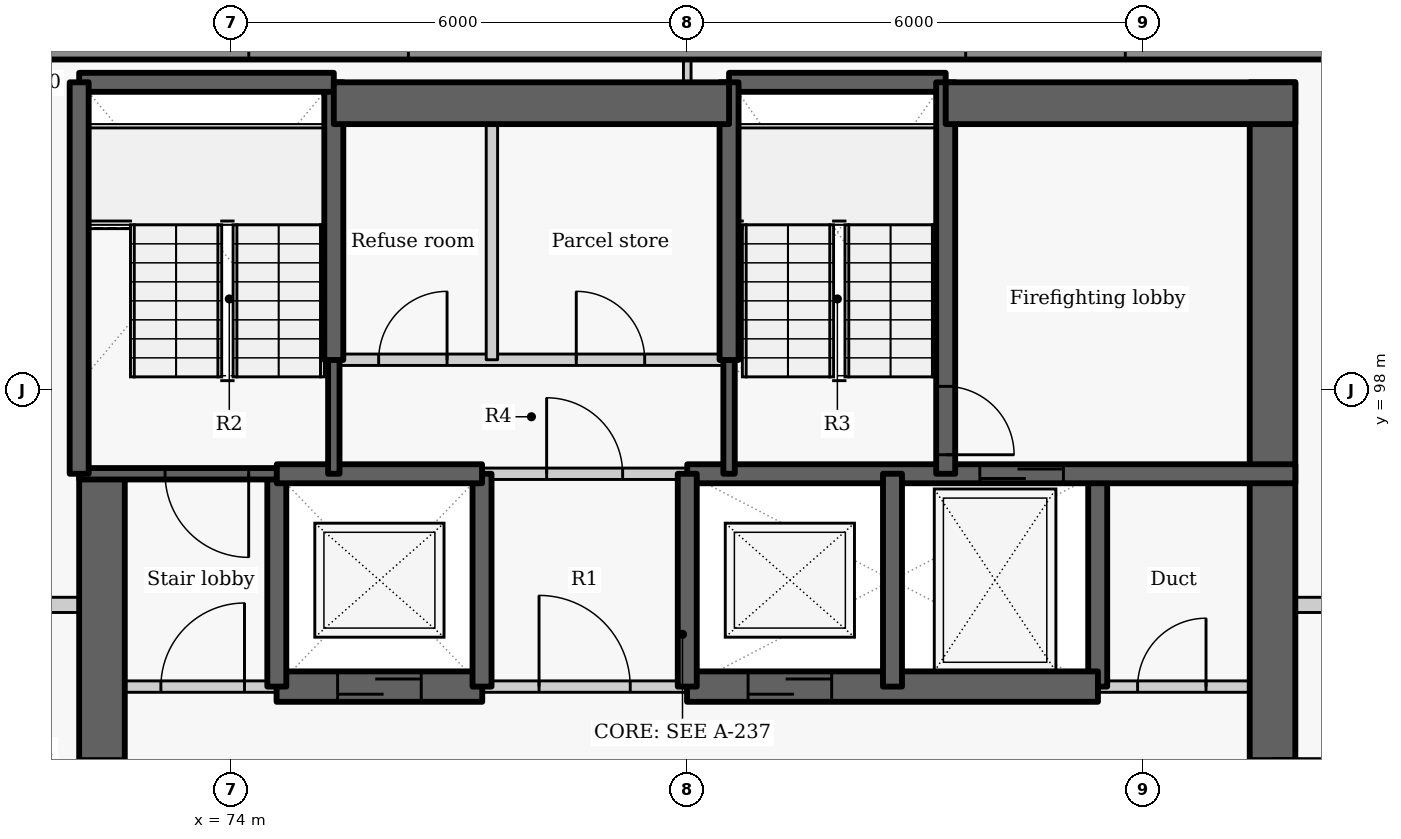
"""IFC4 building model, lengths in metres.
Left out: names, types, materials, properties, quantities, classifications, styles, units other than length and angle.
Written with IfcOpenShell. Run it as: python <this file> out.ifc"""

import sys

from ifc_helpers import new_model, si_unit, direction, frame, frame_2d, origin, place, context, subcontext, project, spatial, rectangle, extrude, element, fill, save


model = new_model("IFC4")
c1 = context("Model", 3, precision=1e-05, world=origin(), true_north=direction((0.0, 1.0)))
c2 = subcontext(c1, "Body", "Model", "MODEL_VIEW")
j1 = project(units=[si_unit("LENGTHUNIT", "METRE"), si_unit("PLANEANGLEUNIT", "RADIAN")], contexts=[c1])
p1 = place(None, origin())
s1 = spatial("IfcSite", under=j1, at=p1, CompositionType="ELEMENT")
p2 = place(p1, origin())
s2 = spatial("IfcBuilding", under=s1, at=p2, CompositionType="ELEMENT")
p3 = place(p2, frame((0.0, 0.0, 216.3)))
s3 = spatial("IfcBuildingStorey", under=s2, at=p3, CompositionType="ELEMENT", Elevation=216.3)
p4 = place(p3, frame((89.449, 102.5, 0.0), z_axis=(0.0, 0.0, 1.0), x_axis=(-1.0, 0.0, 0.0)))
e1 = element("IfcWall", 1, at=p4, inside=s3, PredefinedType="SOLIDWALL", context=c2, shape_type="SweptSolid", body=[
    extrude(rectangle(XDim=18.933, YDim=0.3, at=frame_2d((9.466, 0.0))), origin(), (0.0, 0.0, 1.0), 2.05),
])
p5 = place(p4, frame((3.687, 0.0, 0.9)))
e2 = element("IfcOpeningElement", 2, at=p5, cuts=e1, PredefinedType="OPENING", context=c2, shape_type="SweptSolid", body=[
    extrude(rectangle(XDim=2.1, YDim=1.1, at=frame_2d((1.05, 0.55))), frame((0.0, 0.16, 0.0), z_axis=(0.0, -1.0, 0.0), x_axis=(1.0, 0.0, 0.0)), (0.0, 0.0, 1.0), 0.32),
])
p6 = place(p4, frame((13.118, 0.0, 0.9)))
e3 = element("IfcOpeningElement", 3, at=p6, cuts=e1, PredefinedType="OPENING", context=c2, shape_type="SweptSolid", body=[
    extrude(rectangle(XDim=2.1, YDim=1.1, at=frame_2d((1.05, 0.55))), frame((0.0, 0.16, 0.0), z_axis=(0.0, -1.0, 0.0), x_axis=(1.0, 0.0, 0.0)), (0.0, 0.0, 1.0), 0.32),
])
p7 = place(p3, frame((72.3, 87.8, -0.275), z_axis=(0.0, 0.0, 1.0), x_axis=(0.0, 1.0, 0.0)))
e4 = element("IfcWall", 4, at=p7, inside=s3, PredefinedType="SHEAR", context=c2, shape_type="SweptSolid", body=[
    extrude(rectangle(XDim=9.1, YDim=0.6, at=frame_2d((4.55, 0.0))), origin(), (0.0, 0.0, 1.0), 3.225),
])
p8 = place(p7, frame((3.852, 0.0, 0.275)))
e5 = element("IfcOpeningElement", 5, at=p8, cuts=e4, PredefinedType="OPENING", context=c2, shape_type="SweptSolid", body=[
    extrude(rectangle(XDim=1.5, YDim=2.1, at=frame_2d((0.75, 1.05))), frame((0.0, 0.31, 0.0), z_axis=(0.0, -1.0, 0.0), x_axis=(1.0, 0.0, 0.0)), (0.0, 0.0, 1.0), 0.62),
])
p9 = place(p3, frame((85.4, 94.1, -0.275), z_axis=(0.0, 0.0, 1.0), x_axis=(0.0, 1.0, 0.0)))
e6 = element("IfcWall", 6, at=p9, inside=s3, PredefinedType="SHEAR", context=c2, shape_type="SweptSolid", body=[
    extrude(rectangle(XDim=2.8, YDim=0.25, at=frame_2d((1.4, 0.0))), origin(), (0.0, 0.0, 1.0), 3.225),
])
p10 = place(p3, frame((87.7, 102.05, -0.275), z_axis=(0.0, 0.0, 1.0), x_axis=(0.0, -1.0, 0.0)))
e7 = element("IfcWall", 7, at=p10, inside=s3, PredefinedType="SHEAR", context=c2, shape_type="SweptSolid", body=[
    extrude(rectangle(XDim=14.25, YDim=0.6, at=frame_2d((7.125, 0.0))), origin(), (0.0, 0.0, 1.0), 3.225),
])
p11 = place(p10, frame((8.898, 0.0, 0.275)))
e8 = element("IfcOpeningElement", 8, at=p11, cuts=e7, PredefinedType="OPENING", context=c2, shape_type="SweptSolid", body=[
    extrude(rectangle(XDim=1.5, YDim=2.1, at=frame_2d((0.75, 1.05))), frame((0.0, 0.31, 0.0), z_axis=(0.0, -1.0, 0.0), x_axis=(1.0, 0.0, 0.0)), (0.0, 0.0, 1.0), 0.62),
])
p12 = place(p3, frame((72.0, 94.1, 0.0), z_axis=(0.0, 0.0, 1.0), x_axis=(1.0, 0.0, 0.0)))
e9 = element("IfcWall", 9, at=p12, inside=s3, PredefinedType="PARTITIONING", context=c2, shape_type="SweptSolid", body=[
    extrude(rectangle(XDim=2.603, YDim=0.15, at=frame_2d((1.302, 0.0))), origin(), (0.0, 0.0, 1.0), 2.95),
])
p13 = place(p12, frame((1.075, 0.0, 0.0)))
e10 = element("IfcOpeningElement", 10, at=p13, cuts=e9, PredefinedType="OPENING", context=c2, shape_type="SweptSolid", body=[
    extrude(rectangle(XDim=1.1, YDim=2.1, at=frame_2d((0.55, 1.05))), frame((0.0, 0.085, 0.0), z_axis=(0.0, -1.0, 0.0), x_axis=(1.0, 0.0, 0.0)), (0.0, 0.0, 1.0), 0.17),
])
p14 = place(p3, frame((77.297, 94.1, 0.0), z_axis=(0.0, 0.0, 1.0), x_axis=(1.0, 0.0, 0.0)))
e11 = element("IfcWall", 11, at=p14, inside=s3, PredefinedType="PARTITIONING", context=c2, shape_type="SweptSolid", body=[
    extrude(rectangle(XDim=2.706, YDim=0.15, at=frame_2d((1.353, 0.0))), origin(), (0.0, 0.0, 1.0), 2.95),
])
p15 = place(p14, frame((0.753, 0.0, 0.0)))
e12 = element("IfcOpeningElement", 12, at=p15, cuts=e11, PredefinedType="OPENING", context=c2, shape_type="SweptSolid", body=[
    extrude(rectangle(XDim=1.2, YDim=2.1, at=frame_2d((0.6, 1.05))), frame((0.0, 0.085, 0.0), z_axis=(0.0, -1.0, 0.0), x_axis=(1.0, 0.0, 0.0)), (0.0, 0.0, 1.0), 0.17),
])
p16 = place(p3, frame((85.397, 94.1, 0.0), z_axis=(0.0, 0.0, 1.0), x_axis=(1.0, 0.0, 0.0)))
e13 = element("IfcWall", 13, at=p16, inside=s3, PredefinedType="PARTITIONING", context=c2, shape_type="SweptSolid", body=[
    extrude(rectangle(XDim=2.603, YDim=0.15, at=frame_2d((1.302, 0.0))), origin(), (0.0, 0.0, 1.0), 2.95),
])
p17 = place(p16, frame((0.528, 0.0, 0.0)))
e14 = element("IfcOpeningElement", 14, at=p17, cuts=e13, PredefinedType="OPENING", context=c2, shape_type="SweptSolid", body=[
    extrude(rectangle(XDim=0.9, YDim=2.1, at=frame_2d((0.45, 1.05))), frame((0.0, 0.085, 0.0), z_axis=(0.0, -1.0, 0.0), x_axis=(1.0, 0.0, 0.0)), (0.0, 0.0, 1.0), 0.17),
])
p18 = place(p3, frame((74.597, 94.1, -0.275), z_axis=(0.0, 0.0, 1.0), x_axis=(1.0, 0.0, 0.0)))
e15 = element("IfcWall", 15, at=p18, inside=s3, PredefinedType="SHEAR", context=c2, shape_type="SweptSolid", body=[
    extrude(rectangle(XDim=2.706, YDim=0.4, at=frame_2d((1.353, 0.0))), origin(), (0.0, 0.0, 1.0), 3.225),
])
p19 = place(p18, frame((0.803, 0.0, 0.275)))
e16 = element("IfcOpeningElement", 16, at=p19, cuts=e15, PredefinedType="OPENING", context=c2, shape_type="SweptSolid", body=[
    extrude(rectangle(XDim=1.1, YDim=2.1, at=frame_2d((0.55, 1.05))), frame((0.0, 0.21, 0.0), z_axis=(0.0, -1.0, 0.0), x_axis=(1.0, 0.0, 0.0)), (0.0, 0.0, 1.0), 0.42),
])
p20 = place(p3, frame((79.997, 94.1, -0.275), z_axis=(0.0, 0.0, 1.0), x_axis=(1.0, 0.0, 0.0)))
e17 = element("IfcWall", 17, at=p20, inside=s3, PredefinedType="SHEAR", context=c2, shape_type="SweptSolid", body=[
    extrude(rectangle(XDim=5.406, YDim=0.4, at=frame_2d((2.703, 0.0))), origin(), (0.0, 0.0, 1.0), 3.225),
])
p21 = place(p20, frame((0.803, 0.0, 0.275)))
e18 = element("IfcOpeningElement", 18, at=p21, cuts=e17, PredefinedType="OPENING", context=c2, shape_type="SweptSolid", body=[
    extrude(rectangle(XDim=1.1, YDim=2.1, at=frame_2d((0.55, 1.05))), frame((0.0, 0.21, 0.0), z_axis=(0.0, -1.0, 0.0), x_axis=(1.0, 0.0, 0.0)), (0.0, 0.0, 1.0), 0.42),
])
p22 = place(p3, frame((74.6, 94.1, -0.275), z_axis=(0.0, 0.0, 1.0), x_axis=(0.0, 1.0, 0.0)))
e19 = element("IfcWall", 19, at=p22, inside=s3, PredefinedType="SHEAR", context=c2, shape_type="SweptSolid", body=[
    extrude(rectangle(XDim=2.8, YDim=0.25, at=frame_2d((1.4, 0.0))), origin(), (0.0, 0.0, 1.0), 3.225),
])
p23 = place(p3, frame((74.6, 96.9, -0.275), z_axis=(0.0, 0.0, 1.0), x_axis=(-1.0, 0.0, 0.0)))
e20 = element("IfcWall", 20, at=p23, inside=s3, PredefinedType="SHEAR", context=c2, shape_type="SweptSolid", body=[
    extrude(rectangle(XDim=2.6, YDim=0.15, at=frame_2d((1.3, 0.0))), origin(), (0.0, 0.0, 1.0), 3.225),
])
p24 = place(p23, frame((0.37, 0.0, 0.275)))
e21 = element("IfcOpeningElement", 21, at=p24, cuts=e20, PredefinedType="OPENING", context=c2, shape_type="SweptSolid", body=[
    extrude(rectangle(XDim=1.1, YDim=2.1, at=frame_2d((0.55, 1.05))), frame((0.0, 0.085, 0.0), z_axis=(0.0, -1.0, 0.0), x_axis=(1.0, 0.0, 0.0)), (0.0, 0.0, 1.0), 0.17),
])
p25 = place(p3, frame((77.3, 94.1, -0.275), z_axis=(0.0, 0.0, 1.0), x_axis=(0.0, 1.0, 0.0)))
e22 = element("IfcWall", 22, at=p25, inside=s3, PredefinedType="SHEAR", context=c2, shape_type="SweptSolid", body=[
    extrude(rectangle(XDim=2.8, YDim=0.25, at=frame_2d((1.4, 0.0))), origin(), (0.0, 0.0, 1.0), 3.225),
])
p26 = place(p3, frame((74.6, 96.9, -0.275), z_axis=(0.0, 0.0, 1.0), x_axis=(1.0, 0.0, 0.0)))
e23 = element("IfcWall", 23, at=p26, inside=s3, PredefinedType="SHEAR", context=c2, shape_type="SweptSolid", body=[
    extrude(rectangle(XDim=2.7, YDim=0.25, at=frame_2d((1.35, 0.0))), origin(), (0.0, 0.0, 1.0), 3.225),
])
p27 = place(p3, frame((80.0, 96.9, -0.275), z_axis=(0.0, 0.0, 1.0), x_axis=(1.0, 0.0, 0.0)))
e24 = element("IfcWall", 24, at=p27, inside=s3, PredefinedType="SHEAR", context=c2, shape_type="SweptSolid", body=[
    extrude(rectangle(XDim=8.0, YDim=0.25, at=frame_2d((4.0, 0.0))), origin(), (0.0, 0.0, 1.0), 3.225),
])
p28 = place(p27, frame((3.849, 0.0, 0.275)))
e25 = element("IfcOpeningElement", 25, at=p28, cuts=e24, PredefinedType="OPENING", context=c2, shape_type="SweptSolid", body=[
    extrude(rectangle(XDim=1.1, YDim=2.1, at=frame_2d((0.55, 1.05))), frame((0.0, 0.135, 0.0), z_axis=(0.0, -1.0, 0.0), x_axis=(1.0, 0.0, 0.0)), (0.0, 0.0, 1.0), 0.27),
])
p29 = place(p3, frame((80.0, 94.1, -0.275), z_axis=(0.0, 0.0, 1.0), x_axis=(0.0, 1.0, 0.0)))
e26 = element("IfcWall", 26, at=p29, inside=s3, PredefinedType="SHEAR", context=c2, shape_type="SweptSolid", body=[
    extrude(rectangle(XDim=2.8, YDim=0.25, at=frame_2d((1.4, 0.0))), origin(), (0.0, 0.0, 1.0), 3.225),
])
p30 = place(p3, frame((77.3, 96.9, 0.0), z_axis=(0.0, 0.0, 1.0), x_axis=(1.0, 0.0, 0.0)))
e27 = element("IfcWall", 27, at=p30, inside=s3, PredefinedType="PARTITIONING", context=c2, shape_type="SweptSolid", body=[
    extrude(rectangle(XDim=2.7, YDim=0.15, at=frame_2d((1.35, 0.0))), origin(), (0.0, 0.0, 1.0), 2.95),
])
p31 = place(p30, frame((0.85, 0.0, 0.0)))
e28 = element("IfcOpeningElement", 28, at=p31, cuts=e27, PredefinedType="OPENING", context=c2, shape_type="SweptSolid", body=[
    extrude(rectangle(XDim=1.0, YDim=2.1, at=frame_2d((0.5, 1.05))), frame((0.0, 0.085, 0.0), z_axis=(0.0, -1.0, 0.0), x_axis=(1.0, 0.0, 0.0)), (0.0, 0.0, 1.0), 0.17),
])
p32 = place(p3, frame((82.7, 94.1, -0.275), z_axis=(0.0, 0.0, 1.0), x_axis=(0.0, 1.0, 0.0)))
e29 = element("IfcWall", 29, at=p32, inside=s3, PredefinedType="SHEAR", context=c2, shape_type="SweptSolid", body=[
    extrude(rectangle(XDim=2.8, YDim=0.25, at=frame_2d((1.4, 0.0))), origin(), (0.0, 0.0, 1.0), 3.225),
])
p33 = place(p3, frame((75.35, 96.9, -0.275), z_axis=(0.0, 0.0, 1.0), x_axis=(0.0, 1.0, 0.0)))
e30 = element("IfcWall", 30, at=p33, inside=s3, PredefinedType="SHEAR", context=c2, shape_type="SweptSolid", body=[
    extrude(rectangle(XDim=1.503, YDim=0.15, at=frame_2d((0.751, 0.0))), origin(), (0.0, 0.0, 1.0), 3.225),
])
p34 = place(p3, frame((75.35, 98.397, -0.275), z_axis=(0.0, 0.0, 1.0), x_axis=(0.0, 1.0, 0.0)))
e31 = element("IfcWall", 31, at=p34, inside=s3, PredefinedType="SHEAR", context=c2, shape_type="SweptSolid", body=[
    extrude(rectangle(XDim=3.653, YDim=0.25, at=frame_2d((1.827, 0.0))), origin(), (0.0, 0.0, 1.0), 3.225),
])
p35 = place(p3, frame((72.0, 102.05, -0.275), z_axis=(0.0, 0.0, 1.0), x_axis=(1.0, 0.0, 0.0)))
e32 = element("IfcWall", 32, at=p35, inside=s3, PredefinedType="SHEAR", context=c2, shape_type="SweptSolid", body=[
    extrude(rectangle(XDim=3.35, YDim=0.25, at=frame_2d((1.675, 0.0))), origin(), (0.0, 0.0, 1.0), 3.225),
])
p36 = place(p3, frame((80.55, 102.05, -0.275), z_axis=(0.0, 0.0, 1.0), x_axis=(1.0, 0.0, 0.0)))
e33 = element("IfcWall", 33, at=p36, inside=s3, PredefinedType="SHEAR", context=c2, shape_type="SweptSolid", body=[
    extrude(rectangle(XDim=2.85, YDim=0.25, at=frame_2d((1.425, 0.0))), origin(), (0.0, 0.0, 1.0), 3.225),
])
p37 = place(p3, frame((72.0, 96.9, -0.275), z_axis=(0.0, 0.0, 1.0), x_axis=(0.0, 1.0, 0.0)))
e34 = element("IfcWall", 34, at=p37, inside=s3, PredefinedType="SHEAR", context=c2, shape_type="SweptSolid", body=[
    extrude(rectangle(XDim=5.15, YDim=0.25, at=frame_2d((2.575, 0.0))), origin(), (0.0, 0.0, 1.0), 3.225),
])
p38 = place(p3, frame((83.4, 102.05, -0.275), z_axis=(0.0, 0.0, 1.0), x_axis=(0.0, -1.0, 0.0)))
e35 = element("IfcWall", 35, at=p38, inside=s3, PredefinedType="SHEAR", context=c2, shape_type="SweptSolid", body=[
    extrude(rectangle(XDim=5.15, YDim=0.25, at=frame_2d((2.575, 0.0))), origin(), (0.0, 0.0, 1.0), 3.225),
])
p39 = place(p38, frame((4.0, 0.0, 0.275)))
e36 = element("IfcOpeningElement", 36, at=p39, cuts=e35, PredefinedType="OPENING", context=c2, shape_type="SweptSolid", body=[
    extrude(rectangle(XDim=0.9, YDim=2.1, at=frame_2d((0.45, 1.05))), frame((0.0, 0.135, 0.0), z_axis=(0.0, -1.0, 0.0), x_axis=(1.0, 0.0, 0.0)), (0.0, 0.0, 1.0), 0.27),
])
p40 = place(p3, frame((80.55, 96.9, -0.275), z_axis=(0.0, 0.0, 1.0), x_axis=(0.0, 1.0, 0.0)))
e37 = element("IfcWall", 37, at=p40, inside=s3, PredefinedType="SHEAR", context=c2, shape_type="SweptSolid", body=[
    extrude(rectangle(XDim=1.503, YDim=0.15, at=frame_2d((0.751, 0.0))), origin(), (0.0, 0.0, 1.0), 3.225),
])
p41 = place(p3, frame((80.55, 98.397, -0.275), z_axis=(0.0, 0.0, 1.0), x_axis=(0.0, 1.0, 0.0)))
e38 = element("IfcWall", 38, at=p41, inside=s3, PredefinedType="SHEAR", context=c2, shape_type="SweptSolid", body=[
    extrude(rectangle(XDim=3.653, YDim=0.25, at=frame_2d((1.827, 0.0))), origin(), (0.0, 0.0, 1.0), 3.225),
])
p42 = place(p3, frame((75.35, 101.775, -0.275), z_axis=(0.0, 0.0, 1.0), x_axis=(1.0, 0.0, 0.0)))
e39 = element("IfcWall", 39, at=p42, inside=s3, PredefinedType="SHEAR", context=c2, shape_type="SweptSolid", body=[
    extrude(rectangle(XDim=5.2, YDim=0.55, at=frame_2d((2.6, 0.0))), origin(), (0.0, 0.0, 1.0), 3.225),
])
p43 = place(p3, frame((83.4, 101.775, -0.275), z_axis=(0.0, 0.0, 1.0), x_axis=(1.0, 0.0, 0.0)))
e40 = element("IfcWall", 40, at=p43, inside=s3, PredefinedType="SHEAR", context=c2, shape_type="SweptSolid", body=[
    extrude(rectangle(XDim=4.6, YDim=0.55, at=frame_2d((2.3, 0.0))), origin(), (0.0, 0.0, 1.0), 3.225),
])
p44 = place(p3, frame((75.35, 98.4, 0.0), z_axis=(0.0, 0.0, 1.0), x_axis=(1.0, 0.0, 0.0)))
e41 = element("IfcWall", 41, at=p44, inside=s3, PredefinedType="PARTITIONING", context=c2, shape_type="SweptSolid", body=[
    extrude(rectangle(XDim=5.2, YDim=0.15, at=frame_2d((2.6, 0.0))), origin(), (0.0, 0.0, 1.0), 2.95),
])
p45 = place(p44, frame((0.59, 0.0, 0.0)))
e42 = element("IfcOpeningElement", 42, at=p45, cuts=e41, PredefinedType="OPENING", context=c2, shape_type="SweptSolid", body=[
    extrude(rectangle(XDim=0.9, YDim=2.1, at=frame_2d((0.45, 1.05))), frame((0.0, 0.085, 0.0), z_axis=(0.0, -1.0, 0.0), x_axis=(1.0, 0.0, 0.0)), (0.0, 0.0, 1.0), 0.17),
])
p46 = place(p44, frame((3.19, 0.0, 0.0)))
e43 = element("IfcOpeningElement", 43, at=p46, cuts=e41, PredefinedType="OPENING", context=c2, shape_type="SweptSolid", body=[
    extrude(rectangle(XDim=0.9, YDim=2.1, at=frame_2d((0.45, 1.05))), frame((0.0, 0.085, 0.0), z_axis=(0.0, -1.0, 0.0), x_axis=(1.0, 0.0, 0.0)), (0.0, 0.0, 1.0), 0.17),
])
p47 = place(p3, frame((77.43, 98.4, 0.0), z_axis=(0.0, 0.0, 1.0), x_axis=(0.0, 1.0, 0.0)))
e44 = element("IfcWall", 44, at=p47, inside=s3, PredefinedType="PARTITIONING", context=c2, shape_type="SweptSolid", body=[
    extrude(rectangle(XDim=3.65, YDim=0.15, at=frame_2d((1.825, 0.0))), origin(), (0.0, 0.0, 1.0), 2.95),
])
p48 = place(p3, frame((69.587, 95.175, 0.0), z_axis=(0.0, 0.0, 1.0), x_axis=(1.0, 0.0, 0.0)))
e45 = element("IfcWall", 45, at=p48, inside=s3, PredefinedType="PARTITIONING", context=c2, shape_type="SweptSolid", body=[
    extrude(rectangle(XDim=2.413, YDim=0.2, at=frame_2d((1.207, 0.0))), origin(), (0.0, 0.0, 1.0), 2.43),
])
p49 = place(p3, frame((88.0, 95.175, 0.0), z_axis=(0.0, 0.0, 1.0), x_axis=(1.0, 0.0, 0.0)))
e46 = element("IfcWall", 46, at=p49, inside=s3, PredefinedType="PARTITIONING", context=c2, shape_type="SweptSolid", body=[
    extrude(rectangle(XDim=1.473, YDim=0.2, at=frame_2d((0.736, 0.0))), origin(), (0.0, 0.0, 1.0), 2.95),
])
p50 = place(p3, frame((80.0, 102.05, 0.0), z_axis=(0.0, 0.0, 1.0), x_axis=(0.0, 1.0, 0.0)))
e47 = element("IfcWall", 47, at=p50, inside=s3, PredefinedType="PARTITIONING", context=c2, shape_type="SweptSolid", body=[
    extrude(rectangle(XDim=0.3, YDim=0.1, at=frame_2d((0.15, 0.0))), origin(), (0.0, 0.0, 1.0), 2.95),
])
p51 = place(p13, origin())
e48 = element("IfcDoor", 48, at=p51, inside=s3, OperationType="SINGLE_SWING_RIGHT", PredefinedType="DOOR", context=c2, shape_type="SweptSolid", body=[
    extrude(rectangle(XDim=1.1, YDim=2.1, at=frame_2d((0.55, 1.05))), frame((0.0, 0.025, 0.0), z_axis=(0.0, -1.0, 0.0), x_axis=(1.0, 0.0, 0.0)), (0.0, 0.0, 1.0), 0.05),
])
fill(e10, e48)
p52 = place(p19, origin())
e49 = element("IfcDoor", 49, at=p52, inside=s3, OperationType="SLIDING_TO_LEFT", PredefinedType="DOOR", context=c2, shape_type="SweptSolid", body=[
    extrude(rectangle(XDim=1.1, YDim=2.1, at=frame_2d((0.55, 1.05))), frame((0.0, 0.025, 0.0), z_axis=(0.0, -1.0, 0.0), x_axis=(1.0, 0.0, 0.0)), (0.0, 0.0, 1.0), 0.05),
])
fill(e16, e49)
p53 = place(p15, origin())
e50 = element("IfcDoor", 50, at=p53, inside=s3, OperationType="DOUBLE_DOOR_SINGLE_SWING", PredefinedType="DOOR", context=c2, shape_type="SweptSolid", body=[
    extrude(rectangle(XDim=1.2, YDim=2.1, at=frame_2d((0.6, 1.05))), frame((0.0, 0.025, 0.0), z_axis=(0.0, -1.0, 0.0), x_axis=(1.0, 0.0, 0.0)), (0.0, 0.0, 1.0), 0.05),
])
fill(e12, e50)
p54 = place(p21, origin())
e51 = element("IfcDoor", 51, at=p54, inside=s3, OperationType="SLIDING_TO_LEFT", PredefinedType="DOOR", context=c2, shape_type="SweptSolid", body=[
    extrude(rectangle(XDim=1.1, YDim=2.1, at=frame_2d((0.55, 1.05))), frame((0.0, 0.025, 0.0), z_axis=(0.0, -1.0, 0.0), x_axis=(1.0, 0.0, 0.0)), (0.0, 0.0, 1.0), 0.05),
])
fill(e18, e51)
p55 = place(p28, origin())
e52 = element("IfcDoor", 52, at=p55, inside=s3, OperationType="SLIDING_TO_LEFT", PredefinedType="DOOR", context=c2, shape_type="SweptSolid", body=[
    extrude(rectangle(XDim=1.1, YDim=2.1, at=frame_2d((0.55, 1.05))), frame((0.0, 0.025, 0.0), z_axis=(0.0, -1.0, 0.0), x_axis=(1.0, 0.0, 0.0)), (0.0, 0.0, 1.0), 0.05),
])
fill(e25, e52)
p56 = place(p17, origin())
e53 = element("IfcDoor", 53, at=p56, inside=s3, OperationType="SINGLE_SWING_RIGHT", PredefinedType="DOOR", context=c2, shape_type="SweptSolid", body=[
    extrude(rectangle(XDim=0.9, YDim=2.1, at=frame_2d((0.45, 1.05))), frame((0.0, 0.025, 0.0), z_axis=(0.0, -1.0, 0.0), x_axis=(1.0, 0.0, 0.0)), (0.0, 0.0, 1.0), 0.05),
])
fill(e14, e53)
p57 = place(p31, origin())
e54 = element("IfcDoor", 54, at=p57, inside=s3, OperationType="SINGLE_SWING_LEFT", PredefinedType="DOOR", context=c2, shape_type="SweptSolid", body=[
    extrude(rectangle(XDim=1.0, YDim=2.1, at=frame_2d((0.5, 1.05))), frame((0.0, 0.025, 0.0), z_axis=(0.0, -1.0, 0.0), x_axis=(1.0, 0.0, 0.0)), (0.0, 0.0, 1.0), 0.05),
])
fill(e28, e54)
p58 = place(p45, origin())
e55 = element("IfcDoor", 55, at=p58, inside=s3, OperationType="SINGLE_SWING_RIGHT", PredefinedType="DOOR", context=c2, shape_type="SweptSolid", body=[
    extrude(rectangle(XDim=0.9, YDim=2.1, at=frame_2d((0.45, 1.05))), frame((0.0, 0.025, 0.0), z_axis=(0.0, -1.0, 0.0), x_axis=(1.0, 0.0, 0.0)), (0.0, 0.0, 1.0), 0.05),
])
fill(e42, e55)
p59 = place(p46, origin())
e56 = element("IfcDoor", 56, at=p59, inside=s3, OperationType="SINGLE_SWING_LEFT", PredefinedType="DOOR", context=c2, shape_type="SweptSolid", body=[
    extrude(rectangle(XDim=0.9, YDim=2.1, at=frame_2d((0.45, 1.05))), frame((0.0, 0.025, 0.0), z_axis=(0.0, -1.0, 0.0), x_axis=(1.0, 0.0, 0.0)), (0.0, 0.0, 1.0), 0.05),
])
fill(e43, e56)
p60 = place(p24, origin())
e57 = element("IfcDoor", 57, at=p60, inside=s3, OperationType="SINGLE_SWING_LEFT", PredefinedType="DOOR", context=c2, shape_type="SweptSolid", body=[
    extrude(rectangle(XDim=1.1, YDim=2.1, at=frame_2d((0.55, 1.05))), frame((0.0, 0.025, 0.0), z_axis=(0.0, -1.0, 0.0), x_axis=(1.0, 0.0, 0.0)), (0.0, 0.0, 1.0), 0.05),
])
fill(e21, e57)
p61 = place(p39, origin())
e58 = element("IfcDoor", 58, at=p61, inside=s3, OperationType="SINGLE_SWING_RIGHT", PredefinedType="DOOR", context=c2, shape_type="SweptSolid", body=[
    extrude(rectangle(XDim=0.9, YDim=2.1, at=frame_2d((0.45, 1.05))), frame((0.0, 0.025, 0.0), z_axis=(0.0, -1.0, 0.0), x_axis=(1.0, 0.0, 0.0)), (0.0, 0.0, 1.0), 0.05),
])
fill(e36, e58)
p62 = place(p11, origin())
e59 = element("IfcDoor", 59, at=p62, inside=s3, OperationType="DOUBLE_DOOR_SINGLE_SWING", PredefinedType="DOOR", context=c2, shape_type="SweptSolid", body=[
    extrude(rectangle(XDim=1.5, YDim=2.1, at=frame_2d((0.75, 1.05))), frame((0.0, 0.025, 0.0), z_axis=(0.0, -1.0, 0.0), x_axis=(1.0, 0.0, 0.0)), (0.0, 0.0, 1.0), 0.05),
])
fill(e8, e59)
p63 = place(p8, origin())
e60 = element("IfcDoor", 60, at=p63, inside=s3, OperationType="DOUBLE_DOOR_SINGLE_SWING", PredefinedType="DOOR", context=c2, shape_type="SweptSolid", body=[
    extrude(rectangle(XDim=1.5, YDim=2.1, at=frame_2d((0.75, 1.05))), frame((0.0, 0.025, 0.0), z_axis=(0.0, -1.0, 0.0), x_axis=(1.0, 0.0, 0.0)), (0.0, 0.0, 1.0), 0.05),
])
fill(e5, e60)
save(model, sys.argv[1])
